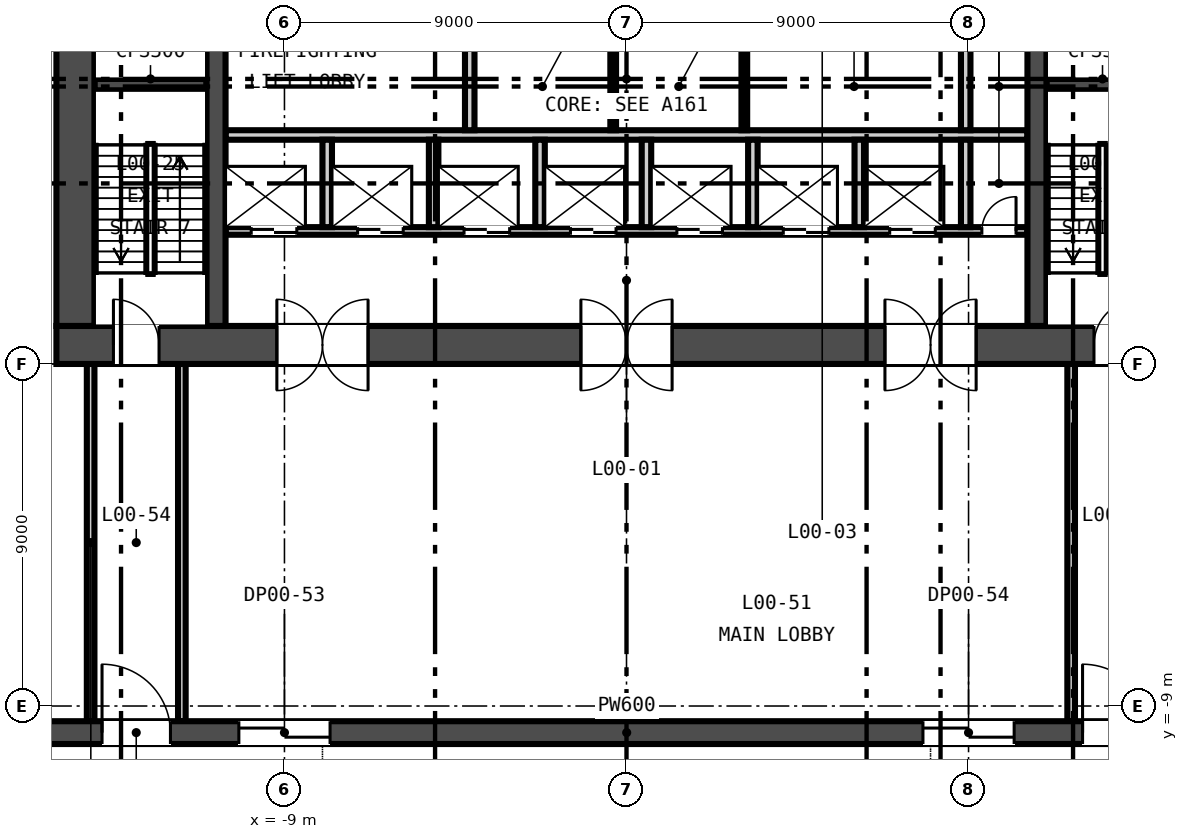
"""IFC4 building model, lengths in metres.
Left out: names, types, materials, properties, quantities, classifications, styles, units other than length and angle.
Written with IfcOpenShell. Run it as: python <this file> out.ifc"""

import sys

from ifc_helpers import new_model, si_unit, direction, frame, frame_2d, origin, place, context, subcontext, project, spatial, rectangle, extrude, element, fill, save


model = new_model("IFC4")
c1 = context("Model", 3, precision=1e-05, world=origin(), true_north=direction((0.0, 1.0)))
c2 = subcontext(c1, "Body", "Model", "MODEL_VIEW")
j1 = project(units=[si_unit("LENGTHUNIT", "METRE"), si_unit("PLANEANGLEUNIT", "RADIAN")], contexts=[c1])
p1 = place(None, origin())
s1 = spatial("IfcSite", under=j1, at=p1, CompositionType="ELEMENT")
p2 = place(p1, origin())
s2 = spatial("IfcBuilding", under=s1, at=p2, CompositionType="ELEMENT")
p3 = place(p2, origin())
s3 = spatial("IfcBuildingStorey", under=s2, at=p3, CompositionType="ELEMENT", Elevation=0.0)
p4 = place(p3, frame((-15.0, 0.5, -2.2), z_axis=(0.0, 0.0, 1.0), x_axis=(1.0, 0.0, 0.0)))
e1 = element("IfcWall", 1, at=p4, inside=s3, PredefinedType="SOLIDWALL", context=c2, shape_type="SweptSolid", body=[
    extrude(rectangle(XDim=30.0, YDim=1.0, at=frame_2d((15.0, 0.0))), origin(), (0.0, 0.0, 1.0), 10.8),
])
p5 = place(p4, frame((5.8, 0.0, 2.2)))
e2 = element("IfcOpeningElement", 2, at=p5, cuts=e1, PredefinedType="OPENING", context=c2, shape_type="SweptSolid", body=[
    extrude(rectangle(XDim=2.4, YDim=2.4, at=frame_2d((1.2, 1.2))), frame((0.0, 0.51, 0.0), z_axis=(0.0, -1.0, 0.0), x_axis=(1.0, 0.0, 0.0)), (0.0, 0.0, 1.0), 1.02),
])
p6 = place(p4, frame((13.8, 0.0, 2.2)))
e3 = element("IfcOpeningElement", 3, at=p6, cuts=e1, PredefinedType="OPENING", context=c2, shape_type="SweptSolid", body=[
    extrude(rectangle(XDim=2.4, YDim=2.4, at=frame_2d((1.2, 1.2))), frame((0.0, 0.51, 0.0), z_axis=(0.0, -1.0, 0.0), x_axis=(1.0, 0.0, 0.0)), (0.0, 0.0, 1.0), 1.02),
])
p7 = place(p4, frame((21.8, 0.0, 2.2)))
e4 = element("IfcOpeningElement", 4, at=p7, cuts=e1, PredefinedType="OPENING", context=c2, shape_type="SweptSolid", body=[
    extrude(rectangle(XDim=2.4, YDim=2.4, at=frame_2d((1.2, 1.2))), frame((0.0, 0.51, 0.0), z_axis=(0.0, -1.0, 0.0), x_axis=(1.0, 0.0, 0.0)), (0.0, 0.0, 1.0), 1.02),
])
p8 = place(p4, frame((1.5, 0.0, 2.2)))
e5 = element("IfcOpeningElement", 5, at=p8, cuts=e1, PredefinedType="OPENING", context=c2, shape_type="SweptSolid", body=[
    extrude(rectangle(XDim=1.2, YDim=2.1, at=frame_2d((0.6, 1.05))), frame((0.0, 0.51, 0.0), z_axis=(0.0, -1.0, 0.0), x_axis=(1.0, 0.0, 0.0)), (0.0, 0.0, 1.0), 1.02),
])
p9 = place(p4, frame((27.3, 0.0, 2.2)))
e6 = element("IfcOpeningElement", 6, at=p9, cuts=e1, PredefinedType="OPENING", context=c2, shape_type="SweptSolid", body=[
    extrude(rectangle(XDim=1.2, YDim=2.1, at=frame_2d((0.6, 1.05))), frame((0.0, 0.51, 0.0), z_axis=(0.0, -1.0, 0.0), x_axis=(1.0, 0.0, 0.0)), (0.0, 0.0, 1.0), 1.02),
])
p10 = place(p3, frame((-14.5, 1.0, -2.2), z_axis=(0.0, 0.0, 1.0), x_axis=(0.0, 1.0, 0.0)))
e7 = element("IfcWall", 7, at=p10, inside=s3, PredefinedType="SOLIDWALL", context=c2, shape_type="SweptSolid", body=[
    extrude(rectangle(XDim=13.0, YDim=1.0, at=frame_2d((6.5, 0.0))), origin(), (0.0, 0.0, 1.0), 10.8),
])
for number, where, z_axis, x_axis in (
    (8, (-10.8, 1.0, -2.2), (0.0, 0.0, 1.0), (0.0, 1.0, 0.0)),
    (9, (10.8, 1.0, -2.2), (0.0, 0.0, 1.0), (0.0, 1.0, 0.0)),
):
    element("IfcWall", number, at=place(p3, frame(where, z_axis=z_axis, x_axis=x_axis)), inside=s3, PredefinedType="SOLIDWALL", context=c2, shape_type="SweptSolid", body=[
        extrude(rectangle(XDim=13.0, YDim=0.5, at=frame_2d((6.5, 0.0))), origin(), (0.0, 0.0, 1.0), 10.8),
    ])
p11 = place(p3, frame((-52.0, -9.7, -0.3), z_axis=(0.0, 0.0, 1.0), x_axis=(1.0, 0.0, 0.0)))
e10 = element("IfcWall", 10, at=p11, inside=s3, PredefinedType="SOLIDWALL", context=c2, shape_type="SweptSolid", body=[
    extrude(rectangle(XDim=104.0, YDim=0.6, at=frame_2d((52.0, 0.0))), origin(), (0.0, 0.0, 1.0), 8.9),
])
p12 = place(p11, frame((67.4, 0.0, 0.3)))
e11 = element("IfcOpeningElement", 11, at=p12, cuts=e10, PredefinedType="OPENING", context=c2, shape_type="SweptSolid", body=[
    extrude(rectangle(XDim=1.2, YDim=2.1, at=frame_2d((0.6, 1.05))), frame((0.0, 0.31, 0.0), z_axis=(0.0, -1.0, 0.0), x_axis=(1.0, 0.0, 0.0)), (0.0, 0.0, 1.0), 0.62),
])
p13 = place(p11, frame((38.2, 0.0, 0.3)))
e12 = element("IfcOpeningElement", 12, at=p13, cuts=e10, PredefinedType="OPENING", context=c2, shape_type="SweptSolid", body=[
    extrude(rectangle(XDim=1.8, YDim=2.4, at=frame_2d((0.9, 1.2))), frame((0.0, 0.31, 0.0), z_axis=(0.0, -1.0, 0.0), x_axis=(1.0, 0.0, 0.0)), (0.0, 0.0, 1.0), 0.62),
])
p14 = place(p11, frame((64.0, 0.0, 0.3)))
e13 = element("IfcOpeningElement", 13, at=p14, cuts=e10, PredefinedType="OPENING", context=c2, shape_type="SweptSolid", body=[
    extrude(rectangle(XDim=1.8, YDim=2.4, at=frame_2d((0.9, 1.2))), frame((0.0, 0.31, 0.0), z_axis=(0.0, -1.0, 0.0), x_axis=(1.0, 0.0, 0.0)), (0.0, 0.0, 1.0), 0.62),
])
p15 = place(p11, frame((41.8, 0.0, 0.3)))
e14 = element("IfcOpeningElement", 14, at=p15, cuts=e10, PredefinedType="OPENING", context=c2, shape_type="SweptSolid", body=[
    extrude(rectangle(XDim=2.4, YDim=2.4, at=frame_2d((1.2, 1.2))), frame((0.0, 0.31, 0.0), z_axis=(0.0, -1.0, 0.0), x_axis=(1.0, 0.0, 0.0)), (0.0, 0.0, 1.0), 0.62),
])
p16 = place(p11, frame((59.8, 0.0, 0.3)))
e15 = element("IfcOpeningElement", 15, at=p16, cuts=e10, PredefinedType="OPENING", context=c2, shape_type="SweptSolid", body=[
    extrude(rectangle(XDim=2.4, YDim=2.4, at=frame_2d((1.2, 1.2))), frame((0.0, 0.31, 0.0), z_axis=(0.0, -1.0, 0.0), x_axis=(1.0, 0.0, 0.0)), (0.0, 0.0, 1.0), 0.62),
])
p17 = place(p11, frame((22.8, 0.0, 0.3)))
e16 = element("IfcOpeningElement", 16, at=p17, cuts=e10, PredefinedType="OPENING", context=c2, shape_type="SweptSolid", body=[
    extrude(rectangle(XDim=2.4, YDim=2.4, at=frame_2d((1.2, 1.2))), frame((0.0, 0.31, 0.0), z_axis=(0.0, -1.0, 0.0), x_axis=(1.0, 0.0, 0.0)), (0.0, 0.0, 1.0), 0.62),
])
p18 = place(p11, frame((78.8, 0.0, 0.3)))
e17 = element("IfcOpeningElement", 17, at=p18, cuts=e10, PredefinedType="OPENING", context=c2, shape_type="SweptSolid", body=[
    extrude(rectangle(XDim=2.4, YDim=2.4, at=frame_2d((1.2, 1.2))), frame((0.0, 0.31, 0.0), z_axis=(0.0, -1.0, 0.0), x_axis=(1.0, 0.0, 0.0)), (0.0, 0.0, 1.0), 0.62),
])
p19 = place(p11, frame((7.1, 0.0, 0.3)))
e18 = element("IfcOpeningElement", 18, at=p19, cuts=e10, PredefinedType="OPENING", context=c2, shape_type="SweptSolid", body=[
    extrude(rectangle(XDim=1.8, YDim=2.4, at=frame_2d((0.9, 1.2))), frame((0.0, 0.31, 0.0), z_axis=(0.0, -1.0, 0.0), x_axis=(1.0, 0.0, 0.0)), (0.0, 0.0, 1.0), 0.62),
])
p20 = place(p11, frame((95.1, 0.0, 0.3)))
e19 = element("IfcOpeningElement", 19, at=p20, cuts=e10, PredefinedType="OPENING", context=c2, shape_type="SweptSolid", body=[
    extrude(rectangle(XDim=1.8, YDim=2.4, at=frame_2d((0.9, 1.2))), frame((0.0, 0.31, 0.0), z_axis=(0.0, -1.0, 0.0), x_axis=(1.0, 0.0, 0.0)), (0.0, 0.0, 1.0), 0.62),
])
p21 = place(p3, frame((-10.55, 3.5, 0.0), z_axis=(0.0, 0.0, 1.0), x_axis=(1.0, 0.0, 0.0)))
e20 = element("IfcWall", 20, at=p21, inside=s3, PredefinedType="PARTITIONING", context=c2, shape_type="SweptSolid", body=[
    extrude(rectangle(XDim=21.1, YDim=0.2, at=frame_2d((10.55, 0.0))), origin(), (0.0, 0.0, 1.0), 8.6),
])
p22 = place(p21, frame((0.675, 0.0, 0.0)))
e21 = element("IfcOpeningElement", 21, at=p22, cuts=e20, PredefinedType="OPENING", context=c2, shape_type="SweptSolid", body=[
    extrude(rectangle(XDim=1.2, YDim=2.1, at=frame_2d((0.6, 1.05))), frame((0.0, 0.11, 0.0), z_axis=(0.0, -1.0, 0.0), x_axis=(1.0, 0.0, 0.0)), (0.0, 0.0, 1.0), 0.22),
])
p23 = place(p21, frame((3.475, 0.0, 0.0)))
e22 = element("IfcOpeningElement", 22, at=p23, cuts=e20, PredefinedType="OPENING", context=c2, shape_type="SweptSolid", body=[
    extrude(rectangle(XDim=1.2, YDim=2.1, at=frame_2d((0.6, 1.05))), frame((0.0, 0.11, 0.0), z_axis=(0.0, -1.0, 0.0), x_axis=(1.0, 0.0, 0.0)), (0.0, 0.0, 1.0), 0.22),
])
p24 = place(p21, frame((6.275, 0.0, 0.0)))
e23 = element("IfcOpeningElement", 23, at=p24, cuts=e20, PredefinedType="OPENING", context=c2, shape_type="SweptSolid", body=[
    extrude(rectangle(XDim=1.2, YDim=2.1, at=frame_2d((0.6, 1.05))), frame((0.0, 0.11, 0.0), z_axis=(0.0, -1.0, 0.0), x_axis=(1.0, 0.0, 0.0)), (0.0, 0.0, 1.0), 0.22),
])
p25 = place(p21, frame((9.075, 0.0, 0.0)))
e24 = element("IfcOpeningElement", 24, at=p25, cuts=e20, PredefinedType="OPENING", context=c2, shape_type="SweptSolid", body=[
    extrude(rectangle(XDim=1.2, YDim=2.1, at=frame_2d((0.6, 1.05))), frame((0.0, 0.11, 0.0), z_axis=(0.0, -1.0, 0.0), x_axis=(1.0, 0.0, 0.0)), (0.0, 0.0, 1.0), 0.22),
])
p26 = place(p21, frame((11.875, 0.0, 0.0)))
e25 = element("IfcOpeningElement", 25, at=p26, cuts=e20, PredefinedType="OPENING", context=c2, shape_type="SweptSolid", body=[
    extrude(rectangle(XDim=1.2, YDim=2.1, at=frame_2d((0.6, 1.05))), frame((0.0, 0.11, 0.0), z_axis=(0.0, -1.0, 0.0), x_axis=(1.0, 0.0, 0.0)), (0.0, 0.0, 1.0), 0.22),
])
p27 = place(p21, frame((14.675, 0.0, 0.0)))
e26 = element("IfcOpeningElement", 26, at=p27, cuts=e20, PredefinedType="OPENING", context=c2, shape_type="SweptSolid", body=[
    extrude(rectangle(XDim=1.2, YDim=2.1, at=frame_2d((0.6, 1.05))), frame((0.0, 0.11, 0.0), z_axis=(0.0, -1.0, 0.0), x_axis=(1.0, 0.0, 0.0)), (0.0, 0.0, 1.0), 0.22),
])
p28 = place(p21, frame((17.475, 0.0, 0.0)))
e27 = element("IfcOpeningElement", 27, at=p28, cuts=e20, PredefinedType="OPENING", context=c2, shape_type="SweptSolid", body=[
    extrude(rectangle(XDim=1.2, YDim=2.1, at=frame_2d((0.6, 1.05))), frame((0.0, 0.11, 0.0), z_axis=(0.0, -1.0, 0.0), x_axis=(1.0, 0.0, 0.0)), (0.0, 0.0, 1.0), 0.22),
])
p29 = place(p21, frame((19.9, 0.0, 0.0)))
e28 = element("IfcOpeningElement", 28, at=p29, cuts=e20, PredefinedType="OPENING", context=c2, shape_type="SweptSolid", body=[
    extrude(rectangle(XDim=0.9, YDim=2.1, at=frame_2d((0.45, 1.05))), frame((0.0, 0.11, 0.0), z_axis=(0.0, -1.0, 0.0), x_axis=(1.0, 0.0, 0.0)), (0.0, 0.0, 1.0), 0.22),
])
p30 = place(p3, frame((-10.55, 6.025, 0.0), z_axis=(0.0, 0.0, 1.0), x_axis=(1.0, 0.0, 0.0)))
e29 = element("IfcWall", 29, at=p30, inside=s3, PredefinedType="PARTITIONING", context=c2, shape_type="SweptSolid", body=[
    extrude(rectangle(XDim=21.1, YDim=0.25, at=frame_2d((10.55, 0.0))), origin(), (0.0, 0.0, 1.0), 8.6),
])
p31 = place(p3, frame((-4.125, 6.15, 0.0), z_axis=(0.0, 0.0, 1.0), x_axis=(0.0, 1.0, 0.0)))
e30 = element("IfcWall", 30, at=p31, inside=s3, PredefinedType="PARTITIONING", context=c2, shape_type="SweptSolid", body=[
    extrude(rectangle(XDim=4.95, YDim=0.25, at=frame_2d((2.475, 0.0))), origin(), (0.0, 0.0, 1.0), 8.6),
])
p32 = place(p31, frame((3.125, 0.0, 0.0)))
e31 = element("IfcOpeningElement", 31, at=p32, cuts=e30, PredefinedType="OPENING", context=c2, shape_type="SweptSolid", body=[
    extrude(rectangle(XDim=1.2, YDim=2.1, at=frame_2d((0.6, 1.05))), frame((0.0, 0.135, 0.0), z_axis=(0.0, -1.0, 0.0), x_axis=(1.0, 0.0, 0.0)), (0.0, 0.0, 1.0), 0.27),
])
for number, where, z_axis, x_axis in (
    (32, (-7.875, 3.6, 0.0), (0.0, 0.0, 1.0), (0.0, 1.0, 0.0)),
    (33, (-5.075, 3.6, 0.0), (0.0, 0.0, 1.0), (0.0, 1.0, 0.0)),
    (34, (-2.275, 3.6, 0.0), (0.0, 0.0, 1.0), (0.0, 1.0, 0.0)),
    (35, (0.525, 3.6, 0.0), (0.0, 0.0, 1.0), (0.0, 1.0, 0.0)),
    (36, (3.325, 3.6, 0.0), (0.0, 0.0, 1.0), (0.0, 1.0, 0.0)),
    (37, (6.125, 3.6, 0.0), (0.0, 0.0, 1.0), (0.0, 1.0, 0.0)),
    (38, (8.925, 3.6, 0.0), (0.0, 0.0, 1.0), (0.0, 1.0, 0.0)),
):
    element("IfcWall", number, at=place(p3, frame(where, z_axis=z_axis, x_axis=x_axis)), inside=s3, PredefinedType="PARTITIONING", context=c2, shape_type="SweptSolid", body=[
        extrude(rectangle(XDim=2.3, YDim=0.25, at=frame_2d((1.15, 0.0))), origin(), (0.0, 0.0, 1.0), 8.6),
    ])
for number, where, z_axis, x_axis in (
    (39, (-0.35, 6.15, 0.0), (0.0, 0.0, 1.0), (0.0, 1.0, 0.0)),
    (40, (3.1, 6.15, 0.0), (0.0, 0.0, 1.0), (0.0, 1.0, 0.0)),
):
    element("IfcWall", number, at=place(p3, frame(where, z_axis=z_axis, x_axis=x_axis)), inside=s3, PredefinedType="PARTITIONING", context=c2, shape_type="SweptSolid", body=[
        extrude(rectangle(XDim=2.3, YDim=0.15, at=frame_2d((1.15, 0.0))), origin(), (0.0, 0.0, 1.0), 8.6),
    ])
p33 = place(p3, frame((8.925, 6.15, 0.0), z_axis=(0.0, 0.0, 1.0), x_axis=(0.0, 1.0, 0.0)))
e41 = element("IfcWall", 41, at=p33, inside=s3, PredefinedType="PARTITIONING", context=c2, shape_type="SweptSolid", body=[
    extrude(rectangle(XDim=2.3, YDim=0.25, at=frame_2d((1.15, 0.0))), origin(), (0.0, 0.0, 1.0), 8.6),
])
for number, where, z_axis, x_axis in (
    (42, (-14.0, 7.35, 0.0), (0.0, 0.0, 1.0), (1.0, 0.0, 0.0)),
    (43, (11.05, 7.35, 0.0), (0.0, 0.0, 1.0), (1.0, 0.0, 0.0)),
):
    element("IfcWall", number, at=place(p3, frame(where, z_axis=z_axis, x_axis=x_axis)), inside=s3, PredefinedType="SOLIDWALL", context=c2, shape_type="SweptSolid", body=[
        extrude(rectangle(XDim=2.95, YDim=0.3, at=frame_2d((1.475, 0.0))), origin(), (0.0, 0.0, 1.0), 8.6),
    ])
for number, where, z_axis, x_axis in (
    (44, (-14.1, -9.4, 0.0), (0.0, 0.0, 1.0), (0.0, 1.0, 0.0)),
    (45, (-11.7, -9.4, 0.0), (0.0, 0.0, 1.0), (0.0, 1.0, 0.0)),
    (46, (11.7, -9.4, 0.0), (0.0, 0.0, 1.0), (0.0, 1.0, 0.0)),
):
    element("IfcWall", number, at=place(p3, frame(where, z_axis=z_axis, x_axis=x_axis)), inside=s3, PredefinedType="PARTITIONING", context=c2, shape_type="SweptSolid", body=[
        extrude(rectangle(XDim=9.4, YDim=0.2, at=frame_2d((4.7, 0.0))), origin(), (0.0, 0.0, 1.0), 8.6),
    ])
p34 = place(p22, origin())
e47 = element("IfcDoor", 47, at=p34, inside=s3, OperationType="DOUBLE_DOOR_SLIDING", PredefinedType="DOOR", context=c2, shape_type="SweptSolid", body=[
    extrude(rectangle(XDim=1.2, YDim=2.1, at=frame_2d((0.6, 1.05))), frame((0.0, 0.025, 0.0), z_axis=(0.0, -1.0, 0.0), x_axis=(1.0, 0.0, 0.0)), (0.0, 0.0, 1.0), 0.05),
])
fill(e21, e47)
p35 = place(p23, origin())
e48 = element("IfcDoor", 48, at=p35, inside=s3, OperationType="DOUBLE_DOOR_SLIDING", PredefinedType="DOOR", context=c2, shape_type="SweptSolid", body=[
    extrude(rectangle(XDim=1.2, YDim=2.1, at=frame_2d((0.6, 1.05))), frame((0.0, 0.025, 0.0), z_axis=(0.0, -1.0, 0.0), x_axis=(1.0, 0.0, 0.0)), (0.0, 0.0, 1.0), 0.05),
])
fill(e22, e48)
p36 = place(p24, origin())
e49 = element("IfcDoor", 49, at=p36, inside=s3, OperationType="DOUBLE_DOOR_SLIDING", PredefinedType="DOOR", context=c2, shape_type="SweptSolid", body=[
    extrude(rectangle(XDim=1.2, YDim=2.1, at=frame_2d((0.6, 1.05))), frame((0.0, 0.025, 0.0), z_axis=(0.0, -1.0, 0.0), x_axis=(1.0, 0.0, 0.0)), (0.0, 0.0, 1.0), 0.05),
])
fill(e23, e49)
p37 = place(p25, origin())
e50 = element("IfcDoor", 50, at=p37, inside=s3, OperationType="DOUBLE_DOOR_SLIDING", PredefinedType="DOOR", context=c2, shape_type="SweptSolid", body=[
    extrude(rectangle(XDim=1.2, YDim=2.1, at=frame_2d((0.6, 1.05))), frame((0.0, 0.025, 0.0), z_axis=(0.0, -1.0, 0.0), x_axis=(1.0, 0.0, 0.0)), (0.0, 0.0, 1.0), 0.05),
])
fill(e24, e50)
p38 = place(p26, origin())
e51 = element("IfcDoor", 51, at=p38, inside=s3, OperationType="DOUBLE_DOOR_SLIDING", PredefinedType="DOOR", context=c2, shape_type="SweptSolid", body=[
    extrude(rectangle(XDim=1.2, YDim=2.1, at=frame_2d((0.6, 1.05))), frame((0.0, 0.025, 0.0), z_axis=(0.0, -1.0, 0.0), x_axis=(1.0, 0.0, 0.0)), (0.0, 0.0, 1.0), 0.05),
])
fill(e25, e51)
p39 = place(p27, origin())
e52 = element("IfcDoor", 52, at=p39, inside=s3, OperationType="DOUBLE_DOOR_SLIDING", PredefinedType="DOOR", context=c2, shape_type="SweptSolid", body=[
    extrude(rectangle(XDim=1.2, YDim=2.1, at=frame_2d((0.6, 1.05))), frame((0.0, 0.025, 0.0), z_axis=(0.0, -1.0, 0.0), x_axis=(1.0, 0.0, 0.0)), (0.0, 0.0, 1.0), 0.05),
])
fill(e26, e52)
p40 = place(p28, origin())
e53 = element("IfcDoor", 53, at=p40, inside=s3, OperationType="DOUBLE_DOOR_SLIDING", PredefinedType="DOOR", context=c2, shape_type="SweptSolid", body=[
    extrude(rectangle(XDim=1.2, YDim=2.1, at=frame_2d((0.6, 1.05))), frame((0.0, 0.025, 0.0), z_axis=(0.0, -1.0, 0.0), x_axis=(1.0, 0.0, 0.0)), (0.0, 0.0, 1.0), 0.05),
])
fill(e27, e53)
p41 = place(p29, origin())
e54 = element("IfcDoor", 54, at=p41, inside=s3, OperationType="SINGLE_SWING_RIGHT", PredefinedType="DOOR", context=c2, shape_type="SweptSolid", body=[
    extrude(rectangle(XDim=0.9, YDim=2.1, at=frame_2d((0.45, 1.05))), frame((0.0, 0.025, 0.0), z_axis=(0.0, -1.0, 0.0), x_axis=(1.0, 0.0, 0.0)), (0.0, 0.0, 1.0), 0.05),
])
fill(e28, e54)
p42 = place(p5, origin())
e55 = element("IfcDoor", 55, at=p42, inside=s3, OperationType="DOUBLE_DOOR_DOUBLE_SWING", PredefinedType="DOOR", context=c2, shape_type="SweptSolid", body=[
    extrude(rectangle(XDim=2.4, YDim=2.4, at=frame_2d((1.2, 1.2))), frame((0.0, 0.025, 0.0), z_axis=(0.0, -1.0, 0.0), x_axis=(1.0, 0.0, 0.0)), (0.0, 0.0, 1.0), 0.05),
])
fill(e2, e55)
p43 = place(p6, origin())
e56 = element("IfcDoor", 56, at=p43, inside=s3, OperationType="DOUBLE_DOOR_DOUBLE_SWING", PredefinedType="DOOR", context=c2, shape_type="SweptSolid", body=[
    extrude(rectangle(XDim=2.4, YDim=2.4, at=frame_2d((1.2, 1.2))), frame((0.0, 0.025, 0.0), z_axis=(0.0, -1.0, 0.0), x_axis=(1.0, 0.0, 0.0)), (0.0, 0.0, 1.0), 0.05),
])
fill(e3, e56)
p44 = place(p7, origin())
e57 = element("IfcDoor", 57, at=p44, inside=s3, OperationType="DOUBLE_DOOR_DOUBLE_SWING", PredefinedType="DOOR", context=c2, shape_type="SweptSolid", body=[
    extrude(rectangle(XDim=2.4, YDim=2.4, at=frame_2d((1.2, 1.2))), frame((0.0, 0.025, 0.0), z_axis=(0.0, -1.0, 0.0), x_axis=(1.0, 0.0, 0.0)), (0.0, 0.0, 1.0), 0.05),
])
fill(e4, e57)
p45 = place(p8, origin())
e58 = element("IfcDoor", 58, at=p45, inside=s3, OperationType="SINGLE_SWING_LEFT", PredefinedType="DOOR", context=c2, shape_type="SweptSolid", body=[
    extrude(rectangle(XDim=1.2, YDim=2.1, at=frame_2d((0.6, 1.05))), frame((0.0, 0.025, 0.0), z_axis=(0.0, -1.0, 0.0), x_axis=(1.0, 0.0, 0.0)), (0.0, 0.0, 1.0), 0.05),
])
fill(e5, e58)
p46 = place(p9, origin())
e59 = element("IfcDoor", 59, at=p46, inside=s3, OperationType="SINGLE_SWING_RIGHT", PredefinedType="DOOR", context=c2, shape_type="SweptSolid", body=[
    extrude(rectangle(XDim=1.2, YDim=2.1, at=frame_2d((0.6, 1.05))), frame((0.0, 0.025, 0.0), z_axis=(0.0, -1.0, 0.0), x_axis=(1.0, 0.0, 0.0)), (0.0, 0.0, 1.0), 0.05),
])
fill(e6, e59)
p47 = place(p13, frame((1.8, 0.0, 0.0), z_axis=(0.0, 0.0, 1.0), x_axis=(-1.0, 0.0, 0.0)))
e60 = element("IfcDoor", 60, at=p47, inside=s3, OperationType="SINGLE_SWING_LEFT", PredefinedType="DOOR", context=c2, shape_type="SweptSolid", body=[
    extrude(rectangle(XDim=1.8, YDim=2.4, at=frame_2d((0.9, 1.2))), frame((0.0, 0.025, 0.0), z_axis=(0.0, -1.0, 0.0), x_axis=(1.0, 0.0, 0.0)), (0.0, 0.0, 1.0), 0.05),
])
fill(e12, e60)
p48 = place(p14, frame((1.8, 0.0, 0.0), z_axis=(0.0, 0.0, 1.0), x_axis=(-1.0, 0.0, 0.0)))
e61 = element("IfcDoor", 61, at=p48, inside=s3, OperationType="SINGLE_SWING_LEFT", PredefinedType="DOOR", context=c2, shape_type="SweptSolid", body=[
    extrude(rectangle(XDim=1.8, YDim=2.4, at=frame_2d((0.9, 1.2))), frame((0.0, 0.025, 0.0), z_axis=(0.0, -1.0, 0.0), x_axis=(1.0, 0.0, 0.0)), (0.0, 0.0, 1.0), 0.05),
])
fill(e13, e61)
p49 = place(p15, frame((2.4, 0.0, 0.0), z_axis=(0.0, 0.0, 1.0), x_axis=(-1.0, 0.0, 0.0)))
e62 = element("IfcDoor", 62, at=p49, inside=s3, OperationType="SINGLE_SWING_LEFT", PredefinedType="DOOR", context=c2, shape_type="SweptSolid", body=[
    extrude(rectangle(XDim=2.4, YDim=2.4, at=frame_2d((1.2, 1.2))), frame((0.0, 0.025, 0.0), z_axis=(0.0, -1.0, 0.0), x_axis=(1.0, 0.0, 0.0)), (0.0, 0.0, 1.0), 0.05),
])
fill(e14, e62)
p50 = place(p16, frame((2.4, 0.0, 0.0), z_axis=(0.0, 0.0, 1.0), x_axis=(-1.0, 0.0, 0.0)))
e63 = element("IfcDoor", 63, at=p50, inside=s3, OperationType="SINGLE_SWING_LEFT", PredefinedType="DOOR", context=c2, shape_type="SweptSolid", body=[
    extrude(rectangle(XDim=2.4, YDim=2.4, at=frame_2d((1.2, 1.2))), frame((0.0, 0.025, 0.0), z_axis=(0.0, -1.0, 0.0), x_axis=(1.0, 0.0, 0.0)), (0.0, 0.0, 1.0), 0.05),
])
fill(e15, e63)
save(model, sys.argv[1])
